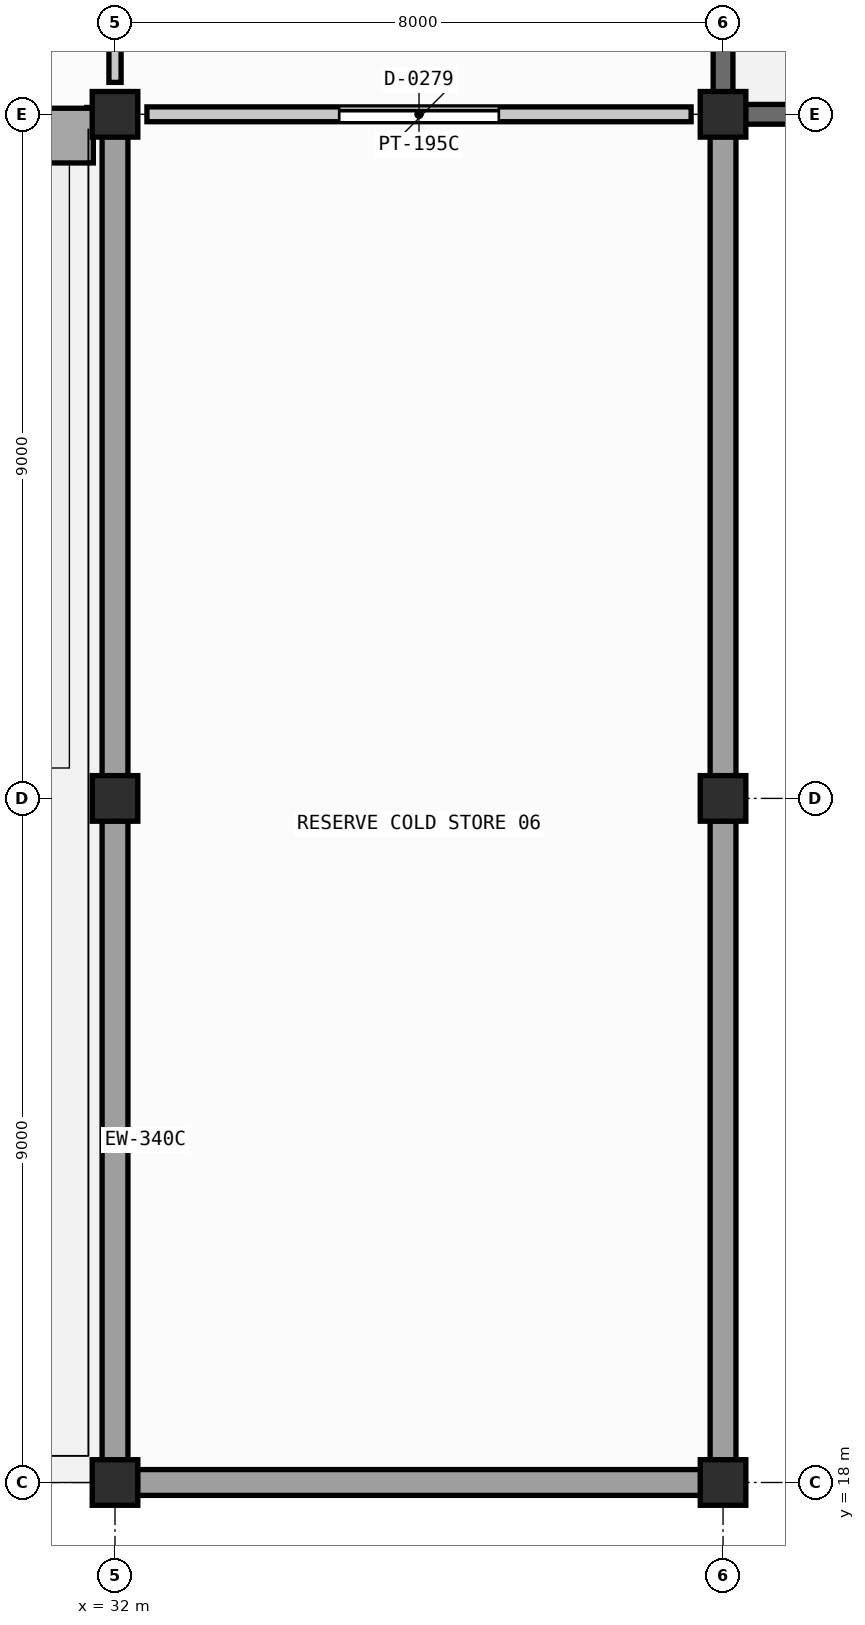
"""IFC4 building model, lengths in metres.
Left out: names, types, materials, properties, quantities, classifications, styles, units other than length and angle.
Written with IfcOpenShell. Run it as: python <this file> out.ifc"""

import sys

from ifc_helpers import new_model, si_unit, direction, frame, frame_2d, origin, origin_2d, place, context, subcontext, project, spatial, rectangle, extrude, element, fill, save


model = new_model("IFC4")
c1 = context("Model", 3, precision=1e-05, world=origin(), true_north=direction((0.0, 1.0)))
c2 = subcontext(c1, "Body", "Model", "MODEL_VIEW")
j1 = project(units=[si_unit("LENGTHUNIT", "METRE"), si_unit("PLANEANGLEUNIT", "RADIAN")], contexts=[c1])
p1 = place(None, origin())
s1 = spatial("IfcSite", under=j1, at=p1, CompositionType="ELEMENT")
p2 = place(p1, origin())
s2 = spatial("IfcBuilding", under=s1, at=p2, CompositionType="ELEMENT")
p3 = place(p2, frame((0.0, 0.0, 9.0)))
s3 = spatial("IfcBuildingStorey", under=s2, at=p3, CompositionType="ELEMENT", Elevation=9.0)
for number, where, z_axis, x_axis in (
    (1, (32.0, 18.0, 0.0), (0.0, 0.0, 1.0), (1.0, 0.0, 0.0)),
    (2, (32.0, 27.0, 0.0), (0.0, 0.0, 1.0), (1.0, 0.0, 0.0)),
    (3, (32.0, 36.0, 0.0), (0.0, 0.0, 1.0), (1.0, 0.0, 0.0)),
    (4, (40.0, 18.0, 0.0), (0.0, 0.0, 1.0), (1.0, 0.0, 0.0)),
    (5, (40.0, 27.0, 0.0), (0.0, 0.0, 1.0), (1.0, 0.0, 0.0)),
    (6, (40.0, 36.0, 0.0), (0.0, 0.0, 1.0), (1.0, 0.0, 0.0)),
):
    element("IfcColumn", number, at=place(p3, frame(where, z_axis=z_axis, x_axis=x_axis)), inside=s3, PredefinedType="COLUMN", context=c2, shape_type="SweptSolid", body=[
        extrude(rectangle(XDim=0.6, YDim=0.6, at=origin_2d()), origin(), (0.0, 0.0, 1.0), 4.2),
    ])
p4 = place(p3, frame((32.295, 18.0, 0.0), z_axis=(0.0, 0.0, 1.0), x_axis=(1.0, 0.0, 0.0)))
e7 = element("IfcWall", 7, at=p4, inside=s3, PredefinedType="SOLIDWALL", context=c2, shape_type="SweptSolid", body=[
    extrude(rectangle(XDim=7.41, YDim=0.34, at=frame_2d((3.705, 0.0))), origin(), (0.0, 0.0, 1.0), 3.05),
])
for number, where, z_axis, x_axis in (
    (8, (32.0, 26.705, 0.0), (0.0, 0.0, 1.0), (0.0, -1.0, 0.0)),
    (9, (32.0, 35.705, 0.0), (0.0, 0.0, 1.0), (0.0, -1.0, 0.0)),
    (10, (40.0, 18.295, 0.0), (0.0, 0.0, 1.0), (0.0, 1.0, 0.0)),
    (11, (40.0, 27.295, 0.0), (0.0, 0.0, 1.0), (0.0, 1.0, 0.0)),
):
    element("IfcWall", number, at=place(p3, frame(where, z_axis=z_axis, x_axis=x_axis)), inside=s3, PredefinedType="SOLIDWALL", context=c2, shape_type="SweptSolid", body=[
        extrude(rectangle(XDim=8.41, YDim=0.34, at=frame_2d((4.205, 0.0))), origin(), (0.0, 0.0, 1.0), 3.05),
    ])
p5 = place(p3, frame((40.295, 36.0, 0.0), z_axis=(0.0, 0.0, 1.0), x_axis=(1.0, 0.0, 0.0)))
e12 = element("IfcWall", 12, at=p5, inside=s3, PredefinedType="SHEAR", context=c2, shape_type="SweptSolid", body=[
    extrude(rectangle(XDim=7.41, YDim=0.26, at=frame_2d((3.705, 0.0))), origin(), (0.0, 0.0, 1.0), 3.985),
])
p6 = place(p3, frame((40.0, 36.295, 0.0), z_axis=(0.0, 0.0, 1.0), x_axis=(0.0, 1.0, 0.0)))
e13 = element("IfcWall", 13, at=p6, inside=s3, PredefinedType="SHEAR", context=c2, shape_type="SweptSolid", body=[
    extrude(rectangle(XDim=8.41, YDim=0.26, at=frame_2d((4.205, 0.0))), origin(), (0.0, 0.0, 1.0), 3.985),
])
p7 = place(p3, frame((32.0, 36.42, 0.0), z_axis=(0.0, 0.0, 1.0), x_axis=(0.0, 1.0, 0.0)))
e14 = element("IfcWall", 14, at=p7, inside=s3, PredefinedType="PARTITIONING", context=c2, shape_type="SweptSolid", body=[
    extrude(rectangle(XDim=8.16, YDim=0.16, at=frame_2d((4.08, 0.0))), origin(), (0.0, 0.0, 1.0), 3.05),
])
p8 = place(p7, frame((3.56, 0.0, 0.0)))
e15 = element("IfcOpeningElement", 15, at=p8, cuts=e14, PredefinedType="OPENING", context=c2, shape_type="SweptSolid", body=[
    extrude(rectangle(XDim=1.04, YDim=2.13, at=frame_2d((0.52, 1.065))), frame((0.0, 0.09, 0.0), z_axis=(0.0, -1.0, 0.0), x_axis=(1.0, 0.0, 0.0)), (0.0, 0.0, 1.0), 0.18),
])
p9 = place(p3, frame((32.42, 36.0, 0.0), z_axis=(0.0, 0.0, 1.0), x_axis=(1.0, 0.0, 0.0)))
e16 = element("IfcWall", 16, at=p9, inside=s3, PredefinedType="PARTITIONING", context=c2, shape_type="SweptSolid", body=[
    extrude(rectangle(XDim=7.16, YDim=0.195, at=frame_2d((3.58, 0.0))), origin(), (0.0, 0.0, 1.0), 3.05),
])
p10 = place(p9, frame((2.53, 0.0, 0.0)))
e17 = element("IfcOpeningElement", 17, at=p10, cuts=e16, PredefinedType="OPENING", context=c2, shape_type="SweptSolid", body=[
    extrude(rectangle(XDim=2.1, YDim=2.55, at=frame_2d((1.05, 1.275))), frame((0.0, 0.107, 0.0), z_axis=(0.0, -1.0, 0.0), x_axis=(1.0, 0.0, 0.0)), (0.0, 0.0, 1.0), 0.215),
])
p11 = place(p10, origin())
e18 = element("IfcDoor", 18, at=p11, inside=s3, OperationType="SLIDING_TO_LEFT", PredefinedType="DOOR", context=c2, shape_type="SweptSolid", body=[
    extrude(rectangle(XDim=2.1, YDim=2.55, at=frame_2d((1.05, 1.275))), frame((0.0, 0.025, 0.0), z_axis=(0.0, -1.0, 0.0), x_axis=(1.0, 0.0, 0.0)), (0.0, 0.0, 1.0), 0.05),
])
fill(e17, e18)
save(model, sys.argv[1])
